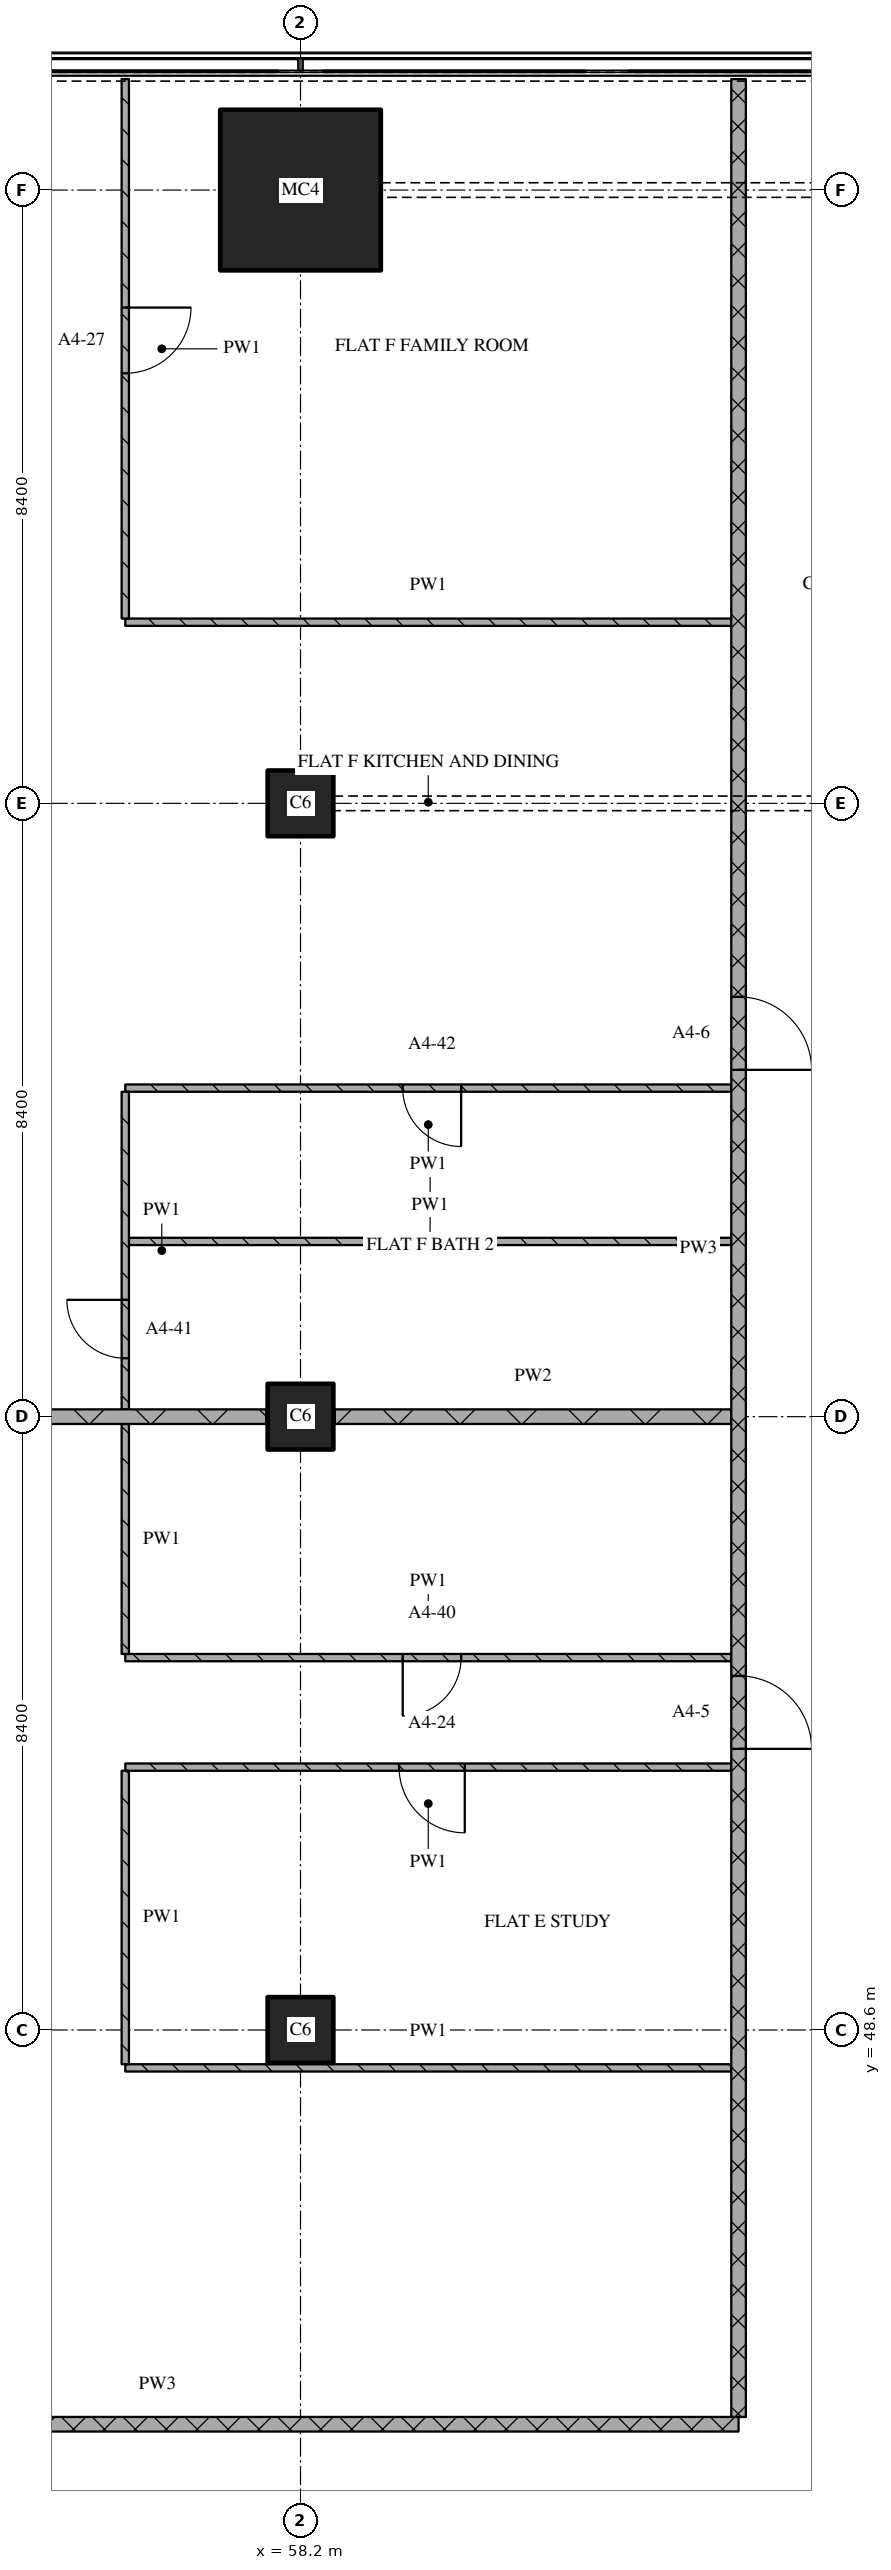
"""IFC4 building model, lengths in metres.
Left out: names, types, materials, properties, quantities, classifications, styles, units other than length and angle.
Written with IfcOpenShell. Run it as: python <this file> out.ifc"""

import sys

from ifc_helpers import new_model, si_unit, direction, frame, frame_2d, origin, origin_2d, place, context, subcontext, project, spatial, rectangle, extrude, element, fill, save


model = new_model("IFC4")
c1 = context("Model", 3, precision=1e-05, world=origin(), true_north=direction((0.0, 1.0)))
c2 = subcontext(c1, "Body", "Model", "MODEL_VIEW")
j1 = project(units=[si_unit("LENGTHUNIT", "METRE"), si_unit("PLANEANGLEUNIT", "RADIAN")], contexts=[c1])
p1 = place(None, origin())
s1 = spatial("IfcSite", under=j1, at=p1, CompositionType="ELEMENT")
p2 = place(p1, origin())
s2 = spatial("IfcBuilding", under=s1, at=p2, CompositionType="ELEMENT")
p3 = place(p2, frame((0.0, 0.0, 76.8)))
s3 = spatial("IfcBuildingStorey", under=s2, at=p3, CompositionType="ELEMENT", Elevation=76.8)
for number, where, z_axis, x_axis in (
    (1, (58.2, 48.6, 0.0), (0.0, 0.0, 1.0), (1.0, 0.0, 0.0)),
    (2, (58.2, 57.0, 0.0), (0.0, 0.0, 1.0), (1.0, 0.0, 0.0)),
    (3, (58.2, 65.4, 0.0), (0.0, 0.0, 1.0), (1.0, 0.0, 0.0)),
):
    element("IfcColumn", number, at=place(p3, frame(where, z_axis=z_axis, x_axis=x_axis)), inside=s3, PredefinedType="COLUMN", context=c2, shape_type="SweptSolid", body=[
        extrude(rectangle(XDim=0.9, YDim=0.9, at=origin_2d()), origin(), (0.0, 0.0, 1.0), 3.6),
    ])
p4 = place(p3, frame((58.2, 73.8, 0.0), z_axis=(0.0, 0.0, 1.0), x_axis=(1.0, 0.0, 0.0)))
e4 = element("IfcColumn", 4, at=p4, inside=s3, PredefinedType="COLUMN", context=c2, shape_type="SweptSolid", body=[
    extrude(rectangle(XDim=2.2, YDim=2.2, at=origin_2d()), origin(), (0.0, 0.0, 1.0), 3.6),
])
p5 = place(p3, frame((48.28, 43.2, 0.0), z_axis=(0.0, 0.0, 1.0), x_axis=(1.0, 0.0, 0.0)))
e5 = element("IfcWall", 5, at=p5, inside=s3, PredefinedType="PARTITIONING", context=c2, shape_type="SweptSolid", body=[
    extrude(rectangle(XDim=15.92, YDim=0.2, at=frame_2d((7.96, 0.0))), origin(), (0.0, 0.0, 1.0), 3.32),
])
p6 = place(p3, frame((55.8, 48.081, 0.0), z_axis=(0.0, 0.0, 1.0), x_axis=(1.0, 0.0, 0.0)))
e6 = element("IfcWall", 6, at=p6, inside=s3, PredefinedType="PARTITIONING", context=c2, shape_type="SweptSolid", body=[
    extrude(rectangle(XDim=8.3, YDim=0.1, at=frame_2d((4.15, 0.0))), origin(), (0.0, 0.0, 1.0), 3.32),
])
p7 = place(p3, frame((64.1, 52.2, 0.0), z_axis=(0.0, 0.0, 1.0), x_axis=(-1.0, 0.0, 0.0)))
e7 = element("IfcWall", 7, at=p7, inside=s3, PredefinedType="PARTITIONING", context=c2, shape_type="SweptSolid", body=[
    extrude(rectangle(XDim=8.3, YDim=0.1, at=frame_2d((4.15, 0.0))), origin(), (0.0, 0.0, 1.0), 3.32),
])
p8 = place(p7, frame((3.65, 0.0, 0.0)))
e8 = element("IfcOpeningElement", 8, at=p8, cuts=e7, PredefinedType="OPENING", context=c2, shape_type="SweptSolid", body=[
    extrude(rectangle(XDim=0.9, YDim=2.1, at=frame_2d((0.45, 1.05))), frame((0.0, 0.06, 0.0), z_axis=(0.0, -1.0, 0.0), x_axis=(1.0, 0.0, 0.0)), (0.0, 0.0, 1.0), 0.12),
])
p9 = place(p3, frame((55.8, 53.7, 0.0), z_axis=(0.0, 0.0, 1.0), x_axis=(1.0, 0.0, 0.0)))
e9 = element("IfcWall", 9, at=p9, inside=s3, PredefinedType="PARTITIONING", context=c2, shape_type="SweptSolid", body=[
    extrude(rectangle(XDim=8.3, YDim=0.1, at=frame_2d((4.15, 0.0))), origin(), (0.0, 0.0, 1.0), 3.32),
])
p10 = place(p9, frame((3.8, 0.0, 0.0)))
e10 = element("IfcOpeningElement", 10, at=p10, cuts=e9, PredefinedType="OPENING", context=c2, shape_type="SweptSolid", body=[
    extrude(rectangle(XDim=0.8, YDim=2.1, at=frame_2d((0.4, 1.05))), frame((0.0, 0.06, 0.0), z_axis=(0.0, -1.0, 0.0), x_axis=(1.0, 0.0, 0.0)), (0.0, 0.0, 1.0), 0.12),
])
p11 = place(p3, frame((50.27, 57.0, 0.0), z_axis=(0.0, 0.0, 1.0), x_axis=(1.0, 0.0, 0.0)))
e11 = element("IfcWall", 11, at=p11, inside=s3, PredefinedType="PARTITIONING", context=c2, shape_type="SweptSolid", body=[
    extrude(rectangle(XDim=7.46, YDim=0.2, at=frame_2d((3.73, 0.0))), origin(), (0.0, 0.0, 1.0), 3.32),
])
p12 = place(p3, frame((58.67, 57.0, 0.0), z_axis=(0.0, 0.0, 1.0), x_axis=(1.0, 0.0, 0.0)))
e12 = element("IfcWall", 12, at=p12, inside=s3, PredefinedType="PARTITIONING", context=c2, shape_type="SweptSolid", body=[
    extrude(rectangle(XDim=5.43, YDim=0.2, at=frame_2d((2.715, 0.0))), origin(), (0.0, 0.0, 1.0), 3.32),
])
p13 = place(p3, frame((55.85, 59.4, 0.0), z_axis=(0.0, 0.0, 1.0), x_axis=(1.0, 0.0, 0.0)))
e13 = element("IfcWall", 13, at=p13, inside=s3, PredefinedType="PARTITIONING", context=c2, shape_type="SweptSolid", body=[
    extrude(rectangle(XDim=8.25, YDim=0.1, at=frame_2d((4.125, 0.0))), origin(), (0.0, 0.0, 1.0), 3.32),
])
p14 = place(p3, frame((64.1, 61.5, 0.0), z_axis=(0.0, 0.0, 1.0), x_axis=(-1.0, 0.0, 0.0)))
e14 = element("IfcWall", 14, at=p14, inside=s3, PredefinedType="PARTITIONING", context=c2, shape_type="SweptSolid", body=[
    extrude(rectangle(XDim=8.3, YDim=0.1, at=frame_2d((4.15, 0.0))), origin(), (0.0, 0.0, 1.0), 3.32),
])
p15 = place(p14, frame((3.7, 0.0, 0.0)))
e15 = element("IfcOpeningElement", 15, at=p15, cuts=e14, PredefinedType="OPENING", context=c2, shape_type="SweptSolid", body=[
    extrude(rectangle(XDim=0.8, YDim=2.1, at=frame_2d((0.4, 1.05))), frame((0.0, 0.06, 0.0), z_axis=(0.0, -1.0, 0.0), x_axis=(1.0, 0.0, 0.0)), (0.0, 0.0, 1.0), 0.12),
])
p16 = place(p3, frame((55.8, 67.881, 0.0), z_axis=(0.0, 0.0, 1.0), x_axis=(1.0, 0.0, 0.0)))
e16 = element("IfcWall", 16, at=p16, inside=s3, PredefinedType="PARTITIONING", context=c2, shape_type="SweptSolid", body=[
    extrude(rectangle(XDim=8.3, YDim=0.1, at=frame_2d((4.15, 0.0))), origin(), (0.0, 0.0, 1.0), 3.32),
])
p17 = place(p3, frame((55.8, 52.15, 0.0), z_axis=(0.0, 0.0, 1.0), x_axis=(0.0, -1.0, 0.0)))
e17 = element("IfcWall", 17, at=p17, inside=s3, PredefinedType="PARTITIONING", context=c2, shape_type="SweptSolid", body=[
    extrude(rectangle(XDim=4.019, YDim=0.1, at=frame_2d((2.009, 0.0))), origin(), (0.0, 0.0, 1.0), 3.32),
])
p18 = place(p3, frame((55.8, 75.32, 0.0), z_axis=(0.0, 0.0, 1.0), x_axis=(0.0, -1.0, 0.0)))
e18 = element("IfcWall", 18, at=p18, inside=s3, PredefinedType="PARTITIONING", context=c2, shape_type="SweptSolid", body=[
    extrude(rectangle(XDim=7.389, YDim=0.1, at=frame_2d((3.695, 0.0))), origin(), (0.0, 0.0, 1.0), 3.32),
])
p19 = place(p18, frame((3.129, 0.0, 0.0)))
e19 = element("IfcOpeningElement", 19, at=p19, cuts=e18, PredefinedType="OPENING", context=c2, shape_type="SweptSolid", body=[
    extrude(rectangle(XDim=0.9, YDim=2.1, at=frame_2d((0.45, 1.05))), frame((0.0, 0.06, 0.0), z_axis=(0.0, -1.0, 0.0), x_axis=(1.0, 0.0, 0.0)), (0.0, 0.0, 1.0), 0.12),
])
p20 = place(p3, frame((64.2, 43.3, 0.0), z_axis=(0.0, 0.0, 1.0), x_axis=(0.0, 1.0, 0.0)))
e20 = element("IfcWall", 20, at=p20, inside=s3, PredefinedType="PARTITIONING", context=c2, shape_type="SweptSolid", body=[
    extrude(rectangle(XDim=32.02, YDim=0.2, at=frame_2d((16.01, 0.0))), origin(), (0.0, 0.0, 1.0), 3.32),
])
p21 = place(p20, frame((9.15, 0.0, 0.0)))
e21 = element("IfcOpeningElement", 21, at=p21, cuts=e20, PredefinedType="OPENING", context=c2, shape_type="SweptSolid", body=[
    extrude(rectangle(XDim=1.0, YDim=2.1, at=frame_2d((0.5, 1.05))), frame((0.0, 0.11, 0.0), z_axis=(0.0, -1.0, 0.0), x_axis=(1.0, 0.0, 0.0)), (0.0, 0.0, 1.0), 0.22),
])
p22 = place(p20, frame((18.45, 0.0, 0.0)))
e22 = element("IfcOpeningElement", 22, at=p22, cuts=e20, PredefinedType="OPENING", context=c2, shape_type="SweptSolid", body=[
    extrude(rectangle(XDim=1.0, YDim=2.1, at=frame_2d((0.5, 1.05))), frame((0.0, 0.11, 0.0), z_axis=(0.0, -1.0, 0.0), x_axis=(1.0, 0.0, 0.0)), (0.0, 0.0, 1.0), 0.22),
])
p23 = place(p3, frame((55.8, 56.9, 0.0), z_axis=(0.0, 0.0, 1.0), x_axis=(0.0, -1.0, 0.0)))
e23 = element("IfcWall", 23, at=p23, inside=s3, PredefinedType="PARTITIONING", context=c2, shape_type="SweptSolid", body=[
    extrude(rectangle(XDim=3.15, YDim=0.1, at=frame_2d((1.575, 0.0))), origin(), (0.0, 0.0, 1.0), 3.32),
])
p24 = place(p3, frame((55.8, 61.45, 0.0), z_axis=(0.0, 0.0, 1.0), x_axis=(0.0, -1.0, 0.0)))
e24 = element("IfcWall", 24, at=p24, inside=s3, PredefinedType="PARTITIONING", context=c2, shape_type="SweptSolid", body=[
    extrude(rectangle(XDim=4.35, YDim=0.1, at=frame_2d((2.175, 0.0))), origin(), (0.0, 0.0, 1.0), 3.32),
])
p25 = place(p24, frame((2.85, 0.0, 0.0)))
e25 = element("IfcOpeningElement", 25, at=p25, cuts=e24, PredefinedType="OPENING", context=c2, shape_type="SweptSolid", body=[
    extrude(rectangle(XDim=0.8, YDim=2.1, at=frame_2d((0.4, 1.05))), frame((0.0, 0.06, 0.0), z_axis=(0.0, -1.0, 0.0), x_axis=(1.0, 0.0, 0.0)), (0.0, 0.0, 1.0), 0.12),
])
p26 = place(p8, origin())
e26 = element("IfcDoor", 26, at=p26, inside=s3, OperationType="SINGLE_SWING_LEFT", PredefinedType="DOOR", context=c2, shape_type="SweptSolid", body=[
    extrude(rectangle(XDim=0.9, YDim=2.1, at=frame_2d((0.45, 1.05))), frame((0.0, 0.025, 0.0), z_axis=(0.0, -1.0, 0.0), x_axis=(1.0, 0.0, 0.0)), (0.0, 0.0, 1.0), 0.05),
])
fill(e8, e26)
p27 = place(p10, origin())
e27 = element("IfcDoor", 27, at=p27, inside=s3, OperationType="SINGLE_SWING_RIGHT", PredefinedType="DOOR", context=c2, shape_type="SweptSolid", body=[
    extrude(rectangle(XDim=0.8, YDim=2.1, at=frame_2d((0.4, 1.05))), frame((0.0, 0.025, 0.0), z_axis=(0.0, -1.0, 0.0), x_axis=(1.0, 0.0, 0.0)), (0.0, 0.0, 1.0), 0.05),
])
fill(e10, e27)
p28 = place(p15, origin())
e28 = element("IfcDoor", 28, at=p28, inside=s3, OperationType="SINGLE_SWING_LEFT", PredefinedType="DOOR", context=c2, shape_type="SweptSolid", body=[
    extrude(rectangle(XDim=0.8, YDim=2.1, at=frame_2d((0.4, 1.05))), frame((0.0, 0.025, 0.0), z_axis=(0.0, -1.0, 0.0), x_axis=(1.0, 0.0, 0.0)), (0.0, 0.0, 1.0), 0.05),
])
fill(e15, e28)
p29 = place(p19, origin())
e29 = element("IfcDoor", 29, at=p29, inside=s3, OperationType="SINGLE_SWING_LEFT", PredefinedType="DOOR", context=c2, shape_type="SweptSolid", body=[
    extrude(rectangle(XDim=0.9, YDim=2.1, at=frame_2d((0.45, 1.05))), frame((0.0, 0.025, 0.0), z_axis=(0.0, -1.0, 0.0), x_axis=(1.0, 0.0, 0.0)), (0.0, 0.0, 1.0), 0.05),
])
fill(e19, e29)
p30 = place(p21, origin())
e30 = element("IfcDoor", 30, at=p30, inside=s3, OperationType="SINGLE_SWING_RIGHT", PredefinedType="DOOR", context=c2, shape_type="SweptSolid", body=[
    extrude(rectangle(XDim=1.0, YDim=2.1, at=frame_2d((0.5, 1.05))), frame((0.0, 0.025, 0.0), z_axis=(0.0, -1.0, 0.0), x_axis=(1.0, 0.0, 0.0)), (0.0, 0.0, 1.0), 0.05),
])
fill(e21, e30)
p31 = place(p22, origin())
e31 = element("IfcDoor", 31, at=p31, inside=s3, OperationType="SINGLE_SWING_RIGHT", PredefinedType="DOOR", context=c2, shape_type="SweptSolid", body=[
    extrude(rectangle(XDim=1.0, YDim=2.1, at=frame_2d((0.5, 1.05))), frame((0.0, 0.025, 0.0), z_axis=(0.0, -1.0, 0.0), x_axis=(1.0, 0.0, 0.0)), (0.0, 0.0, 1.0), 0.05),
])
fill(e22, e31)
p32 = place(p25, origin())
e32 = element("IfcDoor", 32, at=p32, inside=s3, OperationType="SINGLE_SWING_RIGHT", PredefinedType="DOOR", context=c2, shape_type="SweptSolid", body=[
    extrude(rectangle(XDim=0.8, YDim=2.1, at=frame_2d((0.4, 1.05))), frame((0.0, 0.025, 0.0), z_axis=(0.0, -1.0, 0.0), x_axis=(1.0, 0.0, 0.0)), (0.0, 0.0, 1.0), 0.05),
])
fill(e25, e32)
save(model, sys.argv[1])
